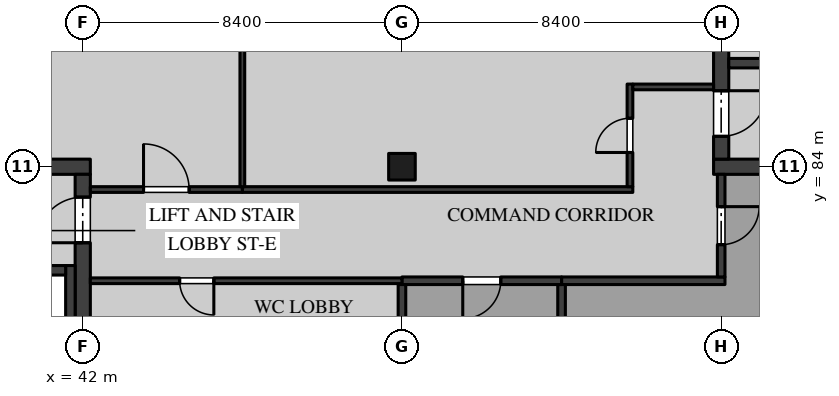
"""IFC4 building model, lengths in metres.
Left out: names, types, materials, properties, quantities, classifications, styles, units other than length and angle.
Written with IfcOpenShell. Run it as: python <this file> out.ifc"""

import sys

from ifc_helpers import new_model, si_unit, direction, frame, frame_2d, origin, origin_2d, place, context, subcontext, project, spatial, rectangle, extrude, element, fill, save


model = new_model("IFC4")
c1 = context("Model", 3, precision=1e-05, world=origin(), true_north=direction((0.0, 1.0)))
c2 = subcontext(c1, "Body", "Model", "MODEL_VIEW")
j1 = project(units=[si_unit("LENGTHUNIT", "METRE"), si_unit("PLANEANGLEUNIT", "RADIAN")], contexts=[c1])
p1 = place(None, origin())
s1 = spatial("IfcSite", under=j1, at=p1, CompositionType="ELEMENT")
p2 = place(p1, origin())
s2 = spatial("IfcBuilding", under=s1, at=p2, CompositionType="ELEMENT")
p3 = place(p2, origin())
s3 = spatial("IfcBuildingStorey", under=s2, at=p3, CompositionType="ELEMENT", Elevation=0.0)
p4 = place(p3, frame((50.4, 84.0, 0.0), z_axis=(0.0, 0.0, 1.0), x_axis=(1.0, 0.0, 0.0)))
e1 = element("IfcColumn", 1, at=p4, inside=s3, PredefinedType="COLUMN", context=c2, shape_type="SweptSolid", body=[
    extrude(rectangle(XDim=0.7, YDim=0.7, at=origin_2d()), origin(), (0.0, 0.0, 1.0), 5.05),
])
p5 = place(p3, frame((33.4, 84.0, 0.0), z_axis=(0.0, 0.0, 1.0), x_axis=(1.0, 0.0, 0.0)))
e2 = element("IfcWall", 2, at=p5, inside=s3, PredefinedType="SHEAR", context=c2, shape_type="SweptSolid", body=[
    extrude(rectangle(XDim=8.8, YDim=0.4, at=frame_2d((4.4, 0.0))), origin(), (0.0, 0.0, 1.0), 5.05),
])
p6 = place(p3, frame((42.0, 75.8, 0.0), z_axis=(0.0, 0.0, 1.0), x_axis=(0.0, 1.0, 0.0)))
e3 = element("IfcWall", 3, at=p6, inside=s3, PredefinedType="SHEAR", context=c2, shape_type="SweptSolid", body=[
    extrude(rectangle(XDim=8.0, YDim=0.4, at=frame_2d((4.0, 0.0))), origin(), (0.0, 0.0, 1.0), 5.05),
])
p7 = place(p6, frame((6.2, 0.0, 0.0)))
e4 = element("IfcOpeningElement", 4, at=p7, cuts=e3, PredefinedType="OPENING", context=c2, shape_type="SweptSolid", body=[
    extrude(rectangle(XDim=1.2, YDim=2.1, at=frame_2d((0.6, 1.05))), frame((0.0, 0.21, 0.0), z_axis=(0.0, -1.0, 0.0), x_axis=(1.0, 0.0, 0.0)), (0.0, 0.0, 1.0), 0.42),
])
p8 = place(p3, frame((58.6, 84.0, 0.0), z_axis=(0.0, 0.0, 1.0), x_axis=(1.0, 0.0, 0.0)))
e5 = element("IfcWall", 5, at=p8, inside=s3, PredefinedType="SHEAR", context=c2, shape_type="SweptSolid", body=[
    extrude(rectangle(XDim=8.8, YDim=0.4, at=frame_2d((4.4, 0.0))), origin(), (0.0, 0.0, 1.0), 5.05),
])
p9 = place(p3, frame((58.8, 84.2, 0.0), z_axis=(0.0, 0.0, 1.0), x_axis=(0.0, 1.0, 0.0)))
e6 = element("IfcWall", 6, at=p9, inside=s3, PredefinedType="SHEAR", context=c2, shape_type="SweptSolid", body=[
    extrude(rectangle(XDim=8.0, YDim=0.4, at=frame_2d((4.0, 0.0))), origin(), (0.0, 0.0, 1.0), 5.05),
])
p10 = place(p9, frame((0.6, 0.0, 0.0)))
e7 = element("IfcOpeningElement", 7, at=p10, cuts=e6, PredefinedType="OPENING", context=c2, shape_type="SweptSolid", body=[
    extrude(rectangle(XDim=1.2, YDim=2.1, at=frame_2d((0.6, 1.05))), frame((0.0, 0.21, 0.0), z_axis=(0.0, -1.0, 0.0), x_axis=(1.0, 0.0, 0.0)), (0.0, 0.0, 1.0), 0.42),
])
p11 = place(p3, frame((61.8, 86.725, 0.0), z_axis=(0.0, 0.0, 1.0), x_axis=(-1.0, 0.0, 0.0)))
e8 = element("IfcWall", 8, at=p11, inside=s3, PredefinedType="SOLIDWALL", context=c2, shape_type="SweptSolid", body=[
    extrude(rectangle(XDim=2.8, YDim=0.25, at=frame_2d((1.4, 0.0))), origin(), (0.0, 0.0, 1.0), 5.05),
])
p12 = place(p3, frame((41.675, 78.75, 0.0), z_axis=(0.0, 0.0, 1.0), x_axis=(0.0, 1.0, 0.0)))
e9 = element("IfcWall", 9, at=p12, inside=s3, PredefinedType="SOLIDWALL", context=c2, shape_type="SweptSolid", body=[
    extrude(rectangle(XDim=2.65, YDim=0.25, at=frame_2d((1.325, 0.0))), origin(), (0.0, 0.0, 1.0), 5.05),
])
p13 = place(p3, frame((39.25, 81.275, 0.0), z_axis=(0.0, 0.0, 1.0), x_axis=(1.0, 0.0, 0.0)))
e10 = element("IfcWall", 10, at=p13, inside=s3, PredefinedType="SOLIDWALL", context=c2, shape_type="SweptSolid", body=[
    extrude(rectangle(XDim=2.3, YDim=0.25, at=frame_2d((1.15, 0.0))), origin(), (0.0, 0.0, 1.0), 5.05),
])
p14 = place(p3, frame((54.6, 81.0, 0.0), z_axis=(0.0, 0.0, 1.0), x_axis=(1.0, 0.0, 0.0)))
e11 = element("IfcWall", 11, at=p14, inside=s3, PredefinedType="PARTITIONING", context=c2, shape_type="SweptSolid", body=[
    extrude(rectangle(XDim=4.3, YDim=0.2, at=frame_2d((2.15, 0.0))), origin(), (0.0, 0.0, 1.0), 5.05),
])
p15 = place(p3, frame((58.8, 81.1, 0.0), z_axis=(0.0, 0.0, 1.0), x_axis=(0.0, 1.0, 0.0)))
e12 = element("IfcWall", 12, at=p15, inside=s3, PredefinedType="PARTITIONING", context=c2, shape_type="SweptSolid", body=[
    extrude(rectangle(XDim=2.7, YDim=0.2, at=frame_2d((1.35, 0.0))), origin(), (0.0, 0.0, 1.0), 5.05),
])
p16 = place(p15, frame((0.85, 0.0, 0.0)))
e13 = element("IfcOpeningElement", 13, at=p16, cuts=e12, PredefinedType="OPENING", context=c2, shape_type="SweptSolid", body=[
    extrude(rectangle(XDim=1.0, YDim=2.1, at=frame_2d((0.5, 1.05))), frame((0.0, 0.11, 0.0), z_axis=(0.0, -1.0, 0.0), x_axis=(1.0, 0.0, 0.0)), (0.0, 0.0, 1.0), 0.22),
])
p17 = place(p3, frame((54.6, 75.75, 0.0), z_axis=(0.0, 0.0, 1.0), x_axis=(0.0, 1.0, 0.0)))
e14 = element("IfcWall", 14, at=p17, inside=s3, PredefinedType="PARTITIONING", context=c2, shape_type="SweptSolid", body=[
    extrude(rectangle(XDim=5.15, YDim=0.2, at=frame_2d((2.575, 0.0))), origin(), (0.0, 0.0, 1.0), 5.05),
])
p18 = place(p3, frame((46.2, 83.4, 0.0), z_axis=(0.0, 0.0, 1.0), x_axis=(1.0, 0.0, 0.0)))
e15 = element("IfcWall", 15, at=p18, inside=s3, PredefinedType="PARTITIONING", context=c2, shape_type="SweptSolid", body=[
    extrude(rectangle(XDim=10.275, YDim=0.15, at=frame_2d((5.138, 0.0))), origin(), (0.0, 0.0, 1.0), 5.05),
])
p19 = place(p3, frame((56.4, 83.475, 0.0), z_axis=(0.0, 0.0, 1.0), x_axis=(0.0, 1.0, 0.0)))
e16 = element("IfcWall", 16, at=p19, inside=s3, PredefinedType="PARTITIONING", context=c2, shape_type="SweptSolid", body=[
    extrude(rectangle(XDim=2.7, YDim=0.15, at=frame_2d((1.35, 0.0))), origin(), (0.0, 0.0, 1.0), 5.05),
])
p20 = place(p19, frame((0.9, 0.0, 0.0)))
e17 = element("IfcOpeningElement", 17, at=p20, cuts=e16, PredefinedType="OPENING", context=c2, shape_type="SweptSolid", body=[
    extrude(rectangle(XDim=0.9, YDim=2.1, at=frame_2d((0.45, 1.05))), frame((0.0, 0.085, 0.0), z_axis=(0.0, -1.0, 0.0), x_axis=(1.0, 0.0, 0.0)), (0.0, 0.0, 1.0), 0.17),
])
p21 = place(p3, frame((56.475, 86.1, 0.0), z_axis=(0.0, 0.0, 1.0), x_axis=(1.0, 0.0, 0.0)))
e18 = element("IfcWall", 18, at=p21, inside=s3, PredefinedType="PARTITIONING", context=c2, shape_type="SweptSolid", body=[
    extrude(rectangle(XDim=2.125, YDim=0.15, at=frame_2d((1.062, 0.0))), origin(), (0.0, 0.0, 1.0), 5.05),
])
p22 = place(p3, frame((42.2, 83.4, 0.0), z_axis=(0.0, 0.0, 1.0), x_axis=(1.0, 0.0, 0.0)))
e19 = element("IfcWall", 19, at=p22, inside=s3, PredefinedType="PARTITIONING", context=c2, shape_type="SweptSolid", body=[
    extrude(rectangle(XDim=4.0, YDim=0.15, at=frame_2d((2.0, 0.0))), origin(), (0.0, 0.0, 1.0), 5.05),
])
p23 = place(p22, frame((1.4, 0.0, 0.0)))
e20 = element("IfcOpeningElement", 20, at=p23, cuts=e19, PredefinedType="OPENING", context=c2, shape_type="SweptSolid", body=[
    extrude(rectangle(XDim=1.2, YDim=2.4, at=frame_2d((0.6, 1.2))), frame((0.0, 0.085, 0.0), z_axis=(0.0, -1.0, 0.0), x_axis=(1.0, 0.0, 0.0)), (0.0, 0.0, 1.0), 0.17),
])
p24 = place(p3, frame((50.4, 81.0, 0.0), z_axis=(0.0, 0.0, 1.0), x_axis=(1.0, 0.0, 0.0)))
e21 = element("IfcWall", 21, at=p24, inside=s3, PredefinedType="PARTITIONING", context=c2, shape_type="SweptSolid", body=[
    extrude(rectangle(XDim=4.2, YDim=0.2, at=frame_2d((2.1, 0.0))), origin(), (0.0, 0.0, 1.0), 5.05),
])
p25 = place(p24, frame((1.6, 0.0, 0.0)))
e22 = element("IfcOpeningElement", 22, at=p25, cuts=e21, PredefinedType="OPENING", context=c2, shape_type="SweptSolid", body=[
    extrude(rectangle(XDim=1.0, YDim=2.1, at=frame_2d((0.5, 1.05))), frame((0.0, 0.11, 0.0), z_axis=(0.0, -1.0, 0.0), x_axis=(1.0, 0.0, 0.0)), (0.0, 0.0, 1.0), 0.22),
])
p26 = place(p3, frame((42.2, 81.0, 0.0), z_axis=(0.0, 0.0, 1.0), x_axis=(1.0, 0.0, 0.0)))
e23 = element("IfcWall", 23, at=p26, inside=s3, PredefinedType="PARTITIONING", context=c2, shape_type="SweptSolid", body=[
    extrude(rectangle(XDim=8.2, YDim=0.15, at=frame_2d((4.1, 0.0))), origin(), (0.0, 0.0, 1.0), 5.05),
])
p27 = place(p26, frame((2.35, 0.0, 0.0)))
e24 = element("IfcOpeningElement", 24, at=p27, cuts=e23, PredefinedType="OPENING", context=c2, shape_type="SweptSolid", body=[
    extrude(rectangle(XDim=0.9, YDim=2.1, at=frame_2d((0.45, 1.05))), frame((0.0, 0.085, 0.0), z_axis=(0.0, -1.0, 0.0), x_axis=(1.0, 0.0, 0.0)), (0.0, 0.0, 1.0), 0.17),
])
p28 = place(p3, frame((46.2, 83.475, 0.0), z_axis=(0.0, 0.0, 1.0), x_axis=(0.0, 1.0, 0.0)))
e25 = element("IfcWall", 25, at=p28, inside=s3, PredefinedType="PARTITIONING", context=c2, shape_type="SweptSolid", body=[
    extrude(rectangle(XDim=8.775, YDim=0.125, at=frame_2d((4.387, 0.0))), origin(), (0.0, 0.0, 1.0), 5.05),
])
p29 = place(p3, frame((50.4, 78.6, 0.0), z_axis=(0.0, 0.0, 1.0), x_axis=(0.0, 1.0, 0.0)))
e26 = element("IfcWall", 26, at=p29, inside=s3, PredefinedType="PARTITIONING", context=c2, shape_type="SweptSolid", body=[
    extrude(rectangle(XDim=2.3, YDim=0.2, at=frame_2d((1.15, 0.0))), origin(), (0.0, 0.0, 1.0), 5.05),
])
p30 = place(p7, origin())
e27 = element("IfcDoor", 27, at=p30, inside=s3, OperationType="SINGLE_SWING_RIGHT", PredefinedType="DOOR", context=c2, shape_type="SweptSolid", body=[
    extrude(rectangle(XDim=1.2, YDim=2.1, at=frame_2d((0.6, 1.05))), frame((0.0, 0.035, 0.0), z_axis=(0.0, -1.0, 0.0), x_axis=(1.0, 0.0, 0.0)), (0.0, 0.0, 1.0), 0.07),
])
fill(e4, e27)
p31 = place(p10, frame((1.2, 0.0, 0.0), z_axis=(0.0, 0.0, 1.0), x_axis=(-1.0, 0.0, 0.0)))
e28 = element("IfcDoor", 28, at=p31, inside=s3, OperationType="SINGLE_SWING_RIGHT", PredefinedType="DOOR", context=c2, shape_type="SweptSolid", body=[
    extrude(rectangle(XDim=1.2, YDim=2.1, at=frame_2d((0.6, 1.05))), frame((0.0, 0.035, 0.0), z_axis=(0.0, -1.0, 0.0), x_axis=(1.0, 0.0, 0.0)), (0.0, 0.0, 1.0), 0.07),
])
fill(e7, e28)
p32 = place(p16, frame((1.0, 0.0, 0.0), z_axis=(0.0, 0.0, 1.0), x_axis=(-1.0, 0.0, 0.0)))
e29 = element("IfcDoor", 29, at=p32, inside=s3, OperationType="SINGLE_SWING_RIGHT", PredefinedType="DOOR", context=c2, shape_type="SweptSolid", body=[
    extrude(rectangle(XDim=1.0, YDim=2.1, at=frame_2d((0.5, 1.05))), frame((0.0, 0.03, 0.0), z_axis=(0.0, -1.0, 0.0), x_axis=(1.0, 0.0, 0.0)), (0.0, 0.0, 1.0), 0.06),
])
fill(e13, e29)
p33 = place(p20, origin())
e30 = element("IfcDoor", 30, at=p33, inside=s3, OperationType="SINGLE_SWING_RIGHT", PredefinedType="DOOR", context=c2, shape_type="SweptSolid", body=[
    extrude(rectangle(XDim=0.9, YDim=2.1, at=frame_2d((0.45, 1.05))), frame((0.0, 0.025, 0.0), z_axis=(0.0, -1.0, 0.0), x_axis=(1.0, 0.0, 0.0)), (0.0, 0.0, 1.0), 0.05),
])
fill(e17, e30)
p34 = place(p23, origin())
e31 = element("IfcDoor", 31, at=p34, inside=s3, OperationType="SINGLE_SWING_RIGHT", PredefinedType="DOOR", context=c2, shape_type="SweptSolid", body=[
    extrude(rectangle(XDim=1.2, YDim=2.4, at=frame_2d((0.6, 1.2))), frame((0.0, 0.025, 0.0), z_axis=(0.0, -1.0, 0.0), x_axis=(1.0, 0.0, 0.0)), (0.0, 0.0, 1.0), 0.05),
])
fill(e20, e31)
p35 = place(p25, frame((1.0, 0.0, 0.0), z_axis=(0.0, 0.0, 1.0), x_axis=(-1.0, 0.0, 0.0)))
e32 = element("IfcDoor", 32, at=p35, inside=s3, OperationType="SINGLE_SWING_LEFT", PredefinedType="DOOR", context=c2, shape_type="SweptSolid", body=[
    extrude(rectangle(XDim=1.0, YDim=2.1, at=frame_2d((0.5, 1.05))), frame((0.0, 0.03, 0.0), z_axis=(0.0, -1.0, 0.0), x_axis=(1.0, 0.0, 0.0)), (0.0, 0.0, 1.0), 0.06),
])
fill(e22, e32)
p36 = place(p27, frame((0.9, 0.0, 0.0), z_axis=(0.0, 0.0, 1.0), x_axis=(-1.0, 0.0, 0.0)))
e33 = element("IfcDoor", 33, at=p36, inside=s3, OperationType="SINGLE_SWING_RIGHT", PredefinedType="DOOR", context=c2, shape_type="SweptSolid", body=[
    extrude(rectangle(XDim=0.9, YDim=2.1, at=frame_2d((0.45, 1.05))), frame((0.0, 0.025, 0.0), z_axis=(0.0, -1.0, 0.0), x_axis=(1.0, 0.0, 0.0)), (0.0, 0.0, 1.0), 0.05),
])
fill(e24, e33)
save(model, sys.argv[1])
